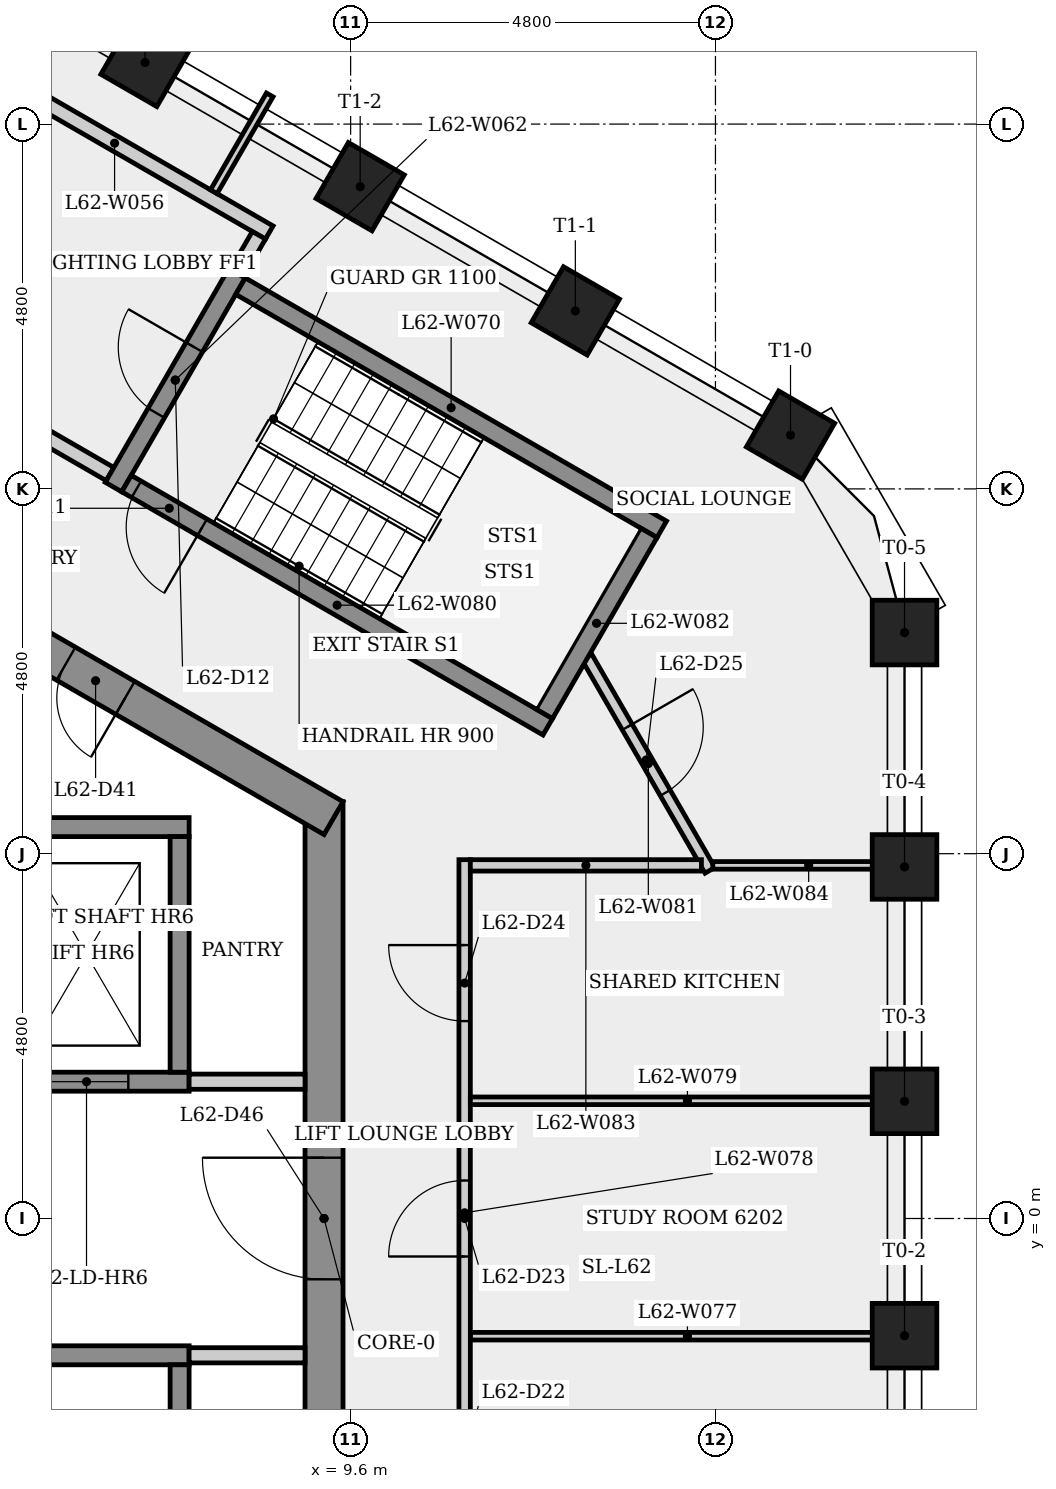
"""IFC4 building model, lengths in metres.
Left out: names, types, materials, properties, quantities, classifications, styles, units other than length and angle.
Written with IfcOpenShell. Run it as: python <this file> out.ifc"""

import sys

from ifc_helpers import new_model, si_unit, direction, frame, frame_2d, origin, origin_2d, place, context, subcontext, project, spatial, rectangle, extrude, element, fill, save


model = new_model("IFC4")
c1 = context("Model", 3, precision=1e-05, world=origin(), true_north=direction((0.0, 1.0)))
c2 = subcontext(c1, "Body", "Model", "MODEL_VIEW")
j1 = project(units=[si_unit("LENGTHUNIT", "METRE"), si_unit("PLANEANGLEUNIT", "RADIAN")], contexts=[c1])
p1 = place(None, origin())
s1 = spatial("IfcSite", under=j1, at=p1, CompositionType="ELEMENT")
p2 = place(p1, origin())
s2 = spatial("IfcBuilding", under=s1, at=p2, CompositionType="ELEMENT")
p3 = place(p2, frame((0.0, 0.0, 232.5)))
s3 = spatial("IfcBuildingStorey", under=s2, at=p3, CompositionType="ELEMENT", Elevation=232.5)
p4 = place(p3, frame((9.25, -5.485, 0.0), z_axis=(0.0, 0.0, 1.0), x_axis=(0.0, 1.0, 0.0)))
e1 = element("IfcWall", 1, at=p4, inside=s3, PredefinedType="SHEAR", context=c2, shape_type="SweptSolid", body=[
    extrude(rectangle(XDim=10.97, YDim=0.5, at=frame_2d((5.485, 0.0))), origin(), (0.0, 0.0, 1.0), 3.4),
])
p5 = place(p4, frame((4.685, 0.0, 0.0)))
e2 = element("IfcOpeningElement", 2, at=p5, cuts=e1, PredefinedType="OPENING", context=c2, shape_type="SweptSolid", body=[
    extrude(rectangle(XDim=1.6, YDim=2.1, at=frame_2d((0.8, 1.05))), frame((0.0, 0.26, 0.0), z_axis=(0.0, -1.0, 0.0), x_axis=(1.0, 0.0, 0.0)), (0.0, 0.0, 1.0), 0.52),
])
p6 = place(p3, frame((9.375, 5.268, 0.0), z_axis=(0.0, 0.0, 1.0), x_axis=(-0.866023993627, 0.500002442456, 0.0)))
e3 = element("IfcWall", 3, at=p6, inside=s3, PredefinedType="SHEAR", context=c2, shape_type="SweptSolid", body=[
    extrude(rectangle(XDim=10.97, YDim=0.5, at=frame_2d((5.485, 0.0))), origin(), (0.0, 0.0, 1.0), 3.4),
])
p7 = place(p6, frame((8.383, 0.0, 0.0)))
e4 = element("IfcOpeningElement", 4, at=p7, cuts=e3, PredefinedType="OPENING", context=c2, shape_type="SweptSolid", body=[
    extrude(rectangle(XDim=0.9, YDim=2.1, at=frame_2d((0.45, 1.05))), frame((0.0, 0.26, 0.0), z_axis=(0.0, -1.0, 0.0), x_axis=(1.0, 0.0, 0.0)), (0.0, 0.0, 1.0), 0.52),
])
p8 = place(p6, frame((3.165, 0.0, 0.0)))
e5 = element("IfcOpeningElement", 5, at=p8, cuts=e3, PredefinedType="OPENING", context=c2, shape_type="SweptSolid", body=[
    extrude(rectangle(XDim=0.9, YDim=2.1, at=frame_2d((0.45, 1.05))), frame((0.0, 0.26, 0.0), z_axis=(0.0, -1.0, 0.0), x_axis=(1.0, 0.0, 0.0)), (0.0, 0.0, 1.0), 0.52),
])
for number, where, z_axis, x_axis in (
    (6, (16.887, -1.542, 0.0), (0.0, 0.0, 1.0), (1.0, 0.0, 0.0)),
    (7, (16.887, 1.542, 0.0), (0.0, 0.0, 1.0), (1.0, 0.0, 0.0)),
    (8, (16.887, 4.626, 0.0), (0.0, 0.0, 1.0), (1.0, 0.0, 0.0)),
    (9, (16.887, 7.709, 0.0), (0.0, 0.0, 1.0), (1.0, 0.0, 0.0)),
    (10, (15.387, 10.308, 0.0), (0.0, 0.0, 1.0), (0.5, 0.866, 0.0)),
    (11, (12.557, 11.942, 0.0), (0.0, 0.0, 1.0), (0.5, 0.866, 0.0)),
    (12, (9.726, 13.576, 0.0), (0.0, 0.0, 1.0), (0.5, 0.866, 0.0)),
    (13, (6.895, 15.211, 0.0), (0.0, 0.0, 1.0), (0.5, 0.866, 0.0)),
):
    element("IfcColumn", number, at=place(p3, frame(where, z_axis=z_axis, x_axis=x_axis)), inside=s3, PredefinedType="COLUMN", context=c2, shape_type="SweptSolid", body=[
        extrude(rectangle(XDim=0.85, YDim=0.85, at=origin_2d()), origin(), (0.0, 0.0, 1.0), 3.4),
    ])
p9 = place(p3, frame((-7.475, 1.8, 0.0), z_axis=(0.0, 0.0, 1.0), x_axis=(1.0, 0.0, 0.0)))
e14 = element("IfcWall", 14, at=p9, inside=s3, PredefinedType="SHEAR", context=c2, shape_type="SweptSolid", body=[
    extrude(rectangle(XDim=14.95, YDim=0.25, at=frame_2d((7.475, 0.0))), origin(), (0.0, 0.0, 1.0), 3.05),
])
p10 = place(p9, frame((0.8, 0.0, 0.0)))
e15 = element("IfcOpeningElement", 15, at=p10, cuts=e14, PredefinedType="OPENING", context=c2, shape_type="SweptSolid", body=[
    extrude(rectangle(XDim=1.1, YDim=2.1, at=frame_2d((0.55, 1.05))), frame((0.0, 0.135, 0.0), z_axis=(0.0, -1.0, 0.0), x_axis=(1.0, 0.0, 0.0)), (0.0, 0.0, 1.0), 0.27),
])
p11 = place(p9, frame((3.25, 0.0, 0.0)))
e16 = element("IfcOpeningElement", 16, at=p11, cuts=e14, PredefinedType="OPENING", context=c2, shape_type="SweptSolid", body=[
    extrude(rectangle(XDim=1.1, YDim=2.1, at=frame_2d((0.55, 1.05))), frame((0.0, 0.135, 0.0), z_axis=(0.0, -1.0, 0.0), x_axis=(1.0, 0.0, 0.0)), (0.0, 0.0, 1.0), 0.27),
])
p12 = place(p9, frame((5.7, 0.0, 0.0)))
e17 = element("IfcOpeningElement", 17, at=p12, cuts=e14, PredefinedType="OPENING", context=c2, shape_type="SweptSolid", body=[
    extrude(rectangle(XDim=1.1, YDim=2.1, at=frame_2d((0.55, 1.05))), frame((0.0, 0.135, 0.0), z_axis=(0.0, -1.0, 0.0), x_axis=(1.0, 0.0, 0.0)), (0.0, 0.0, 1.0), 0.27),
])
p13 = place(p9, frame((8.15, 0.0, 0.0)))
e18 = element("IfcOpeningElement", 18, at=p13, cuts=e14, PredefinedType="OPENING", context=c2, shape_type="SweptSolid", body=[
    extrude(rectangle(XDim=1.1, YDim=2.1, at=frame_2d((0.55, 1.05))), frame((0.0, 0.135, 0.0), z_axis=(0.0, -1.0, 0.0), x_axis=(1.0, 0.0, 0.0)), (0.0, 0.0, 1.0), 0.27),
])
p14 = place(p9, frame((10.6, 0.0, 0.0)))
e19 = element("IfcOpeningElement", 19, at=p14, cuts=e14, PredefinedType="OPENING", context=c2, shape_type="SweptSolid", body=[
    extrude(rectangle(XDim=1.1, YDim=2.1, at=frame_2d((0.55, 1.05))), frame((0.0, 0.135, 0.0), z_axis=(0.0, -1.0, 0.0), x_axis=(1.0, 0.0, 0.0)), (0.0, 0.0, 1.0), 0.27),
])
p15 = place(p9, frame((13.05, 0.0, 0.0)))
e20 = element("IfcOpeningElement", 20, at=p15, cuts=e14, PredefinedType="OPENING", context=c2, shape_type="SweptSolid", body=[
    extrude(rectangle(XDim=1.1, YDim=2.1, at=frame_2d((0.55, 1.05))), frame((0.0, 0.135, 0.0), z_axis=(0.0, -1.0, 0.0), x_axis=(1.0, 0.0, 0.0)), (0.0, 0.0, 1.0), 0.27),
])
p16 = place(p3, frame((-7.225, 5.15, 0.0), z_axis=(0.0, 0.0, 1.0), x_axis=(1.0, 0.0, 0.0)))
e21 = element("IfcWall", 21, at=p16, inside=s3, PredefinedType="SHEAR", context=c2, shape_type="SweptSolid", body=[
    extrude(rectangle(XDim=14.7, YDim=0.25, at=frame_2d((7.35, 0.0))), origin(), (0.0, 0.0, 1.0), 3.05),
])
p17 = place(p3, frame((4.459, 15.323, 0.0), z_axis=(0.0, 0.0, 1.0), x_axis=(0.866016039709, -0.500016218704, 0.0)))
e22 = element("IfcWall", 22, at=p17, inside=s3, PredefinedType="PARTITIONING", context=c2, shape_type="SweptSolid", body=[
    extrude(rectangle(XDim=4.7, YDim=0.2, at=frame_2d((2.35, 0.0))), origin(), (0.0, 0.0, 1.0), 3.05),
])
p18 = place(p3, frame((2.575, -1.8, 0.0), z_axis=(0.0, 0.0, 1.0), x_axis=(1.0, 0.0, 0.0)))
e23 = element("IfcWall", 23, at=p18, inside=s3, PredefinedType="SHEAR", context=c2, shape_type="SweptSolid", body=[
    extrude(rectangle(XDim=4.9, YDim=0.25, at=frame_2d((2.45, 0.0))), origin(), (0.0, 0.0, 1.0), 3.05),
])
p19 = place(p18, frame((0.597, 0.0, 0.0)))
e24 = element("IfcOpeningElement", 24, at=p19, cuts=e23, PredefinedType="OPENING", context=c2, shape_type="SweptSolid", body=[
    extrude(rectangle(XDim=1.1, YDim=2.1, at=frame_2d((0.55, 1.05))), frame((0.0, 0.135, 0.0), z_axis=(0.0, -1.0, 0.0), x_axis=(1.0, 0.0, 0.0)), (0.0, 0.0, 1.0), 0.27),
])
p20 = place(p3, frame((6.435, 9.795, 0.0), z_axis=(0.0, 0.0, 1.0), x_axis=(-0.866012907634, 0.500021643343, 0.0)))
e25 = element("IfcWall", 25, at=p20, inside=s3, PredefinedType="PARTITIONING", context=c2, shape_type="SweptSolid", body=[
    extrude(rectangle(XDim=4.45, YDim=0.2, at=frame_2d((2.225, 0.0))), origin(), (0.0, 0.0, 1.0), 3.05),
])
p21 = place(p20, frame((1.675, 0.0, 0.0)))
e26 = element("IfcOpeningElement", 26, at=p21, cuts=e25, PredefinedType="OPENING", context=c2, shape_type="SweptSolid", body=[
    extrude(rectangle(XDim=1.1, YDim=2.1, at=frame_2d((0.55, 1.05))), frame((0.0, 0.11, 0.0), z_axis=(0.0, -1.0, 0.0), x_axis=(1.0, 0.0, 0.0)), (0.0, 0.0, 1.0), 0.22),
])
p22 = place(p3, frame((6.48, 9.624, 0.0), z_axis=(0.0, 0.0, 1.0), x_axis=(0.500017246033, 0.866015446554, 0.0)))
e27 = element("IfcWall", 27, at=p22, inside=s3, PredefinedType="SHEAR", context=c2, shape_type="SweptSolid", body=[
    extrude(rectangle(XDim=3.25, YDim=0.25, at=frame_2d((1.625, 0.0))), origin(), (0.0, 0.0, 1.0), 3.05),
])
p23 = place(p22, frame((1.125, 0.0, 0.0)))
e28 = element("IfcOpeningElement", 28, at=p23, cuts=e27, PredefinedType="OPENING", context=c2, shape_type="SweptSolid", body=[
    extrude(rectangle(XDim=1.0, YDim=2.1, at=frame_2d((0.5, 1.05))), frame((0.0, 0.135, 0.0), z_axis=(0.0, -1.0, 0.0), x_axis=(1.0, 0.0, 0.0)), (0.0, 0.0, 1.0), 0.27),
])
p24 = place(p3, frame((7.475, 1.8, 0.0), z_axis=(0.0, 0.0, 1.0), x_axis=(1.0, 0.0, 0.0)))
e29 = element("IfcWall", 29, at=p24, inside=s3, PredefinedType="PARTITIONING", context=c2, shape_type="SweptSolid", body=[
    extrude(rectangle(XDim=1.525, YDim=0.2, at=frame_2d((0.763, 0.0))), origin(), (0.0, 0.0, 1.0), 3.05),
])
for number, where, z_axis, x_axis in (
    (30, (7.35, -1.925, 0.0), (0.0, 0.0, 1.0), (0.0, -1.0, 0.0)),
    (31, (7.35, 5.025, 0.0), (0.0, 0.0, 1.0), (0.0, -1.0, 0.0)),
):
    element("IfcWall", number, at=place(p3, frame(where, z_axis=z_axis, x_axis=x_axis)), inside=s3, PredefinedType="SHEAR", context=c2, shape_type="SweptSolid", body=[
        extrude(rectangle(XDim=3.1, YDim=0.25, at=frame_2d((1.55, 0.0))), origin(), (0.0, 0.0, 1.0), 3.4),
    ])
p25 = place(p3, frame((7.8, 13.51, 0.0), z_axis=(0.0, 0.0, 1.0), x_axis=(0.500048082433, 0.865997641599, 0.0)))
e32 = element("IfcWall", 32, at=p25, inside=s3, PredefinedType="PARTITIONING", context=c2, shape_type="SweptSolid", body=[
    extrude(rectangle(XDim=1.471, YDim=0.1, at=frame_2d((0.735, 0.0))), origin(), (0.0, 0.0, 1.0), 3.05),
])
p26 = place(p3, frame((8.151, 12.268, 0.0), z_axis=(0.0, 0.0, 1.0), x_axis=(0.866025499775, -0.499999833739, 0.0)))
e33 = element("IfcWall", 33, at=p26, inside=s3, PredefinedType="SHEAR", context=c2, shape_type="SweptSolid", body=[
    extrude(rectangle(XDim=6.4, YDim=0.25, at=frame_2d((3.2, 0.0))), origin(), (0.0, 0.0, 1.0), 3.05),
])
p27 = place(p3, frame((8.393, 12.937, 0.0), z_axis=(0.0, 0.0, 1.0), x_axis=(-0.500065409566, -0.86598763626, 0.0)))
e34 = element("IfcWall", 34, at=p27, inside=s3, PredefinedType="PARTITIONING", context=c2, shape_type="SweptSolid", body=[
    extrude(rectangle(XDim=0.575, YDim=0.2, at=frame_2d((0.288, 0.0))), origin(), (0.0, 0.0, 1.0), 3.05),
])
p28 = place(p3, frame((9.0, -1.8, 0.0), z_axis=(0.0, 0.0, 1.0), x_axis=(-1.0, 0.0, 0.0)))
e35 = element("IfcWall", 35, at=p28, inside=s3, PredefinedType="PARTITIONING", context=c2, shape_type="SweptSolid", body=[
    extrude(rectangle(XDim=1.525, YDim=0.2, at=frame_2d((0.763, 0.0))), origin(), (0.0, 0.0, 1.0), 3.05),
])
p29 = place(p3, frame((11.175, -1.549, 0.0), z_axis=(0.0, 0.0, 1.0), x_axis=(1.0, 0.0, 0.0)))
e36 = element("IfcWall", 36, at=p29, inside=s3, PredefinedType="PARTITIONING", context=c2, shape_type="SweptSolid", body=[
    extrude(rectangle(XDim=5.712, YDim=0.1, at=frame_2d((2.856, 0.0))), origin(), (0.0, 0.0, 1.0), 3.05),
])
p30 = place(p3, frame((11.1, -4.571, 0.0), z_axis=(0.0, 0.0, 1.0), x_axis=(0.0, 1.0, 0.0)))
e37 = element("IfcWall", 37, at=p30, inside=s3, PredefinedType="PARTITIONING", context=c2, shape_type="SweptSolid", body=[
    extrude(rectangle(XDim=9.292, YDim=0.15, at=frame_2d((4.646, 0.0))), origin(), (0.0, 0.0, 1.0), 3.05),
])
p31 = place(p30, frame((0.996, 0.0, 0.0)))
e38 = element("IfcOpeningElement", 38, at=p31, cuts=e37, PredefinedType="OPENING", context=c2, shape_type="SweptSolid", body=[
    extrude(rectangle(XDim=1.0, YDim=2.1, at=frame_2d((0.5, 1.05))), frame((0.0, 0.085, 0.0), z_axis=(0.0, -1.0, 0.0), x_axis=(1.0, 0.0, 0.0)), (0.0, 0.0, 1.0), 0.17),
])
p32 = place(p30, frame((4.071, 0.0, 0.0)))
e39 = element("IfcOpeningElement", 39, at=p32, cuts=e37, PredefinedType="OPENING", context=c2, shape_type="SweptSolid", body=[
    extrude(rectangle(XDim=1.0, YDim=2.1, at=frame_2d((0.5, 1.05))), frame((0.0, 0.085, 0.0), z_axis=(0.0, -1.0, 0.0), x_axis=(1.0, 0.0, 0.0)), (0.0, 0.0, 1.0), 0.17),
])
p33 = place(p30, frame((7.169, 0.0, 0.0)))
e40 = element("IfcOpeningElement", 40, at=p33, cuts=e37, PredefinedType="OPENING", context=c2, shape_type="SweptSolid", body=[
    extrude(rectangle(XDim=1.0, YDim=2.1, at=frame_2d((0.5, 1.05))), frame((0.0, 0.085, 0.0), z_axis=(0.0, -1.0, 0.0), x_axis=(1.0, 0.0, 0.0)), (0.0, 0.0, 1.0), 0.17),
])
p34 = place(p3, frame((11.175, 1.549, 0.0), z_axis=(0.0, 0.0, 1.0), x_axis=(1.0, 0.0, 0.0)))
e41 = element("IfcWall", 41, at=p34, inside=s3, PredefinedType="PARTITIONING", context=c2, shape_type="SweptSolid", body=[
    extrude(rectangle(XDim=5.712, YDim=0.1, at=frame_2d((2.856, 0.0))), origin(), (0.0, 0.0, 1.0), 3.05),
])
p35 = place(p3, frame((12.194, 6.47, 0.0), z_axis=(0.0, 0.0, 1.0), x_axis=(-0.866025499775, 0.499999833739, 0.0)))
e42 = element("IfcWall", 42, at=p35, inside=s3, PredefinedType="SHEAR", context=c2, shape_type="SweptSolid", body=[
    extrude(rectangle(XDim=6.4, YDim=0.25, at=frame_2d((3.2, 0.0))), origin(), (0.0, 0.0, 1.0), 3.05),
])
p36 = place(p35, frame((5.25, 0.0, 0.0)))
e43 = element("IfcOpeningElement", 43, at=p36, cuts=e42, PredefinedType="OPENING", context=c2, shape_type="SweptSolid", body=[
    extrude(rectangle(XDim=1.0, YDim=2.1, at=frame_2d((0.5, 1.05))), frame((0.0, 0.135, 0.0), z_axis=(0.0, -1.0, 0.0), x_axis=(1.0, 0.0, 0.0)), (0.0, 0.0, 1.0), 0.27),
])
p37 = place(p3, frame((12.706, 7.391, 0.0), z_axis=(0.0, 0.0, 1.0), x_axis=(0.499967850536, -0.866043964491, 0.0)))
e44 = element("IfcWall", 44, at=p37, inside=s3, PredefinedType="PARTITIONING", context=c2, shape_type="SweptSolid", body=[
    extrude(rectangle(XDim=3.244, YDim=0.15, at=frame_2d((1.622, 0.0))), origin(), (0.0, 0.0, 1.0), 3.05),
])
p38 = place(p37, frame((1.067, 0.0, 0.0)))
e45 = element("IfcOpeningElement", 45, at=p38, cuts=e44, PredefinedType="OPENING", context=c2, shape_type="SweptSolid", body=[
    extrude(rectangle(XDim=1.0, YDim=2.1, at=frame_2d((0.5, 1.05))), frame((0.0, 0.085, 0.0), z_axis=(0.0, -1.0, 0.0), x_axis=(1.0, 0.0, 0.0)), (0.0, 0.0, 1.0), 0.17),
])
p39 = place(p3, frame((12.148, 6.641, 0.0), z_axis=(0.0, 0.0, 1.0), x_axis=(0.500034990121, 0.866005201286, 0.0)))
e46 = element("IfcWall", 46, at=p39, inside=s3, PredefinedType="SHEAR", context=c2, shape_type="SweptSolid", body=[
    extrude(rectangle(XDim=2.75, YDim=0.25, at=frame_2d((1.375, 0.0))), origin(), (0.0, 0.0, 1.0), 3.05),
])
p40 = place(p3, frame((14.215, 4.646, 0.0), z_axis=(0.0, 0.0, 1.0), x_axis=(-1.0, 0.0, 0.0)))
e47 = element("IfcWall", 47, at=p40, inside=s3, PredefinedType="PARTITIONING", context=c2, shape_type="SweptSolid", body=[
    extrude(rectangle(XDim=3.04, YDim=0.15, at=frame_2d((1.52, 0.0))), origin(), (0.0, 0.0, 1.0), 3.05),
])
p41 = place(p3, frame((14.365, 4.646, 0.0), z_axis=(0.0, 0.0, 1.0), x_axis=(1.0, 0.0, 0.0)))
e48 = element("IfcWall", 48, at=p41, inside=s3, PredefinedType="PARTITIONING", context=c2, shape_type="SweptSolid", body=[
    extrude(rectangle(XDim=2.522, YDim=0.1, at=frame_2d((1.261, 0.0))), origin(), (0.0, 0.0, 1.0), 3.05),
])
p42 = place(p15, origin())
e49 = element("IfcDoor", 49, at=p42, inside=s3, OperationType="SLIDING_TO_LEFT", PredefinedType="DOOR", context=c2, shape_type="SweptSolid", body=[
    extrude(rectangle(XDim=1.1, YDim=2.1, at=frame_2d((0.55, 1.05))), frame((0.0, 0.025, 0.0), z_axis=(0.0, -1.0, 0.0), x_axis=(1.0, 0.0, 0.0)), (0.0, 0.0, 1.0), 0.05),
])
fill(e20, e49)
p43 = place(p36, origin())
e50 = element("IfcDoor", 50, at=p43, inside=s3, OperationType="SINGLE_SWING_LEFT", PredefinedType="DOOR", context=c2, shape_type="SweptSolid", body=[
    extrude(rectangle(XDim=1.0, YDim=2.1, at=frame_2d((0.5, 1.05))), frame((0.0, 0.025, 0.0), z_axis=(0.0, -1.0, 0.0), x_axis=(1.0, 0.0, 0.0)), (0.0, 0.0, 1.0), 0.05),
])
fill(e43, e50)
p44 = place(p23, origin())
e51 = element("IfcDoor", 51, at=p44, inside=s3, OperationType="SINGLE_SWING_RIGHT", PredefinedType="DOOR", context=c2, shape_type="SweptSolid", body=[
    extrude(rectangle(XDim=1.0, YDim=2.1, at=frame_2d((0.5, 1.05))), frame((0.0, 0.025, 0.0), z_axis=(0.0, -1.0, 0.0), x_axis=(1.0, 0.0, 0.0)), (0.0, 0.0, 1.0), 0.05),
])
fill(e28, e51)
p45 = place(p32, origin())
e52 = element("IfcDoor", 52, at=p45, inside=s3, OperationType="SINGLE_SWING_LEFT", PredefinedType="DOOR", context=c2, shape_type="SweptSolid", body=[
    extrude(rectangle(XDim=1.0, YDim=2.1, at=frame_2d((0.5, 1.05))), frame((0.0, 0.025, 0.0), z_axis=(0.0, -1.0, 0.0), x_axis=(1.0, 0.0, 0.0)), (0.0, 0.0, 1.0), 0.05),
])
fill(e39, e52)
p46 = place(p33, origin())
e53 = element("IfcDoor", 53, at=p46, inside=s3, OperationType="SINGLE_SWING_RIGHT", PredefinedType="DOOR", context=c2, shape_type="SweptSolid", body=[
    extrude(rectangle(XDim=1.0, YDim=2.1, at=frame_2d((0.5, 1.05))), frame((0.0, 0.025, 0.0), z_axis=(0.0, -1.0, 0.0), x_axis=(1.0, 0.0, 0.0)), (0.0, 0.0, 1.0), 0.05),
])
fill(e40, e53)
p47 = place(p38, origin())
e54 = element("IfcDoor", 54, at=p47, inside=s3, OperationType="SINGLE_SWING_LEFT", PredefinedType="DOOR", context=c2, shape_type="SweptSolid", body=[
    extrude(rectangle(XDim=1.0, YDim=2.1, at=frame_2d((0.5, 1.05))), frame((0.0, 0.025, 0.0), z_axis=(0.0, -1.0, 0.0), x_axis=(1.0, 0.0, 0.0)), (0.0, 0.0, 1.0), 0.05),
])
fill(e45, e54)
p48 = place(p8, origin())
e55 = element("IfcDoor", 55, at=p48, inside=s3, OperationType="SINGLE_SWING_LEFT", PredefinedType="DOOR", context=c2, shape_type="SweptSolid", body=[
    extrude(rectangle(XDim=0.9, YDim=2.1, at=frame_2d((0.45, 1.05))), frame((0.0, 0.025, 0.0), z_axis=(0.0, -1.0, 0.0), x_axis=(1.0, 0.0, 0.0)), (0.0, 0.0, 1.0), 0.05),
])
fill(e5, e55)
p49 = place(p5, origin())
e56 = element("IfcDoor", 56, at=p49, inside=s3, OperationType="SINGLE_SWING_RIGHT", PredefinedType="DOOR", context=c2, shape_type="SweptSolid", body=[
    extrude(rectangle(XDim=1.6, YDim=2.1, at=frame_2d((0.8, 1.05))), frame((0.0, 0.025, 0.0), z_axis=(0.0, -1.0, 0.0), x_axis=(1.0, 0.0, 0.0)), (0.0, 0.0, 1.0), 0.05),
])
fill(e2, e56)
save(model, sys.argv[1])
